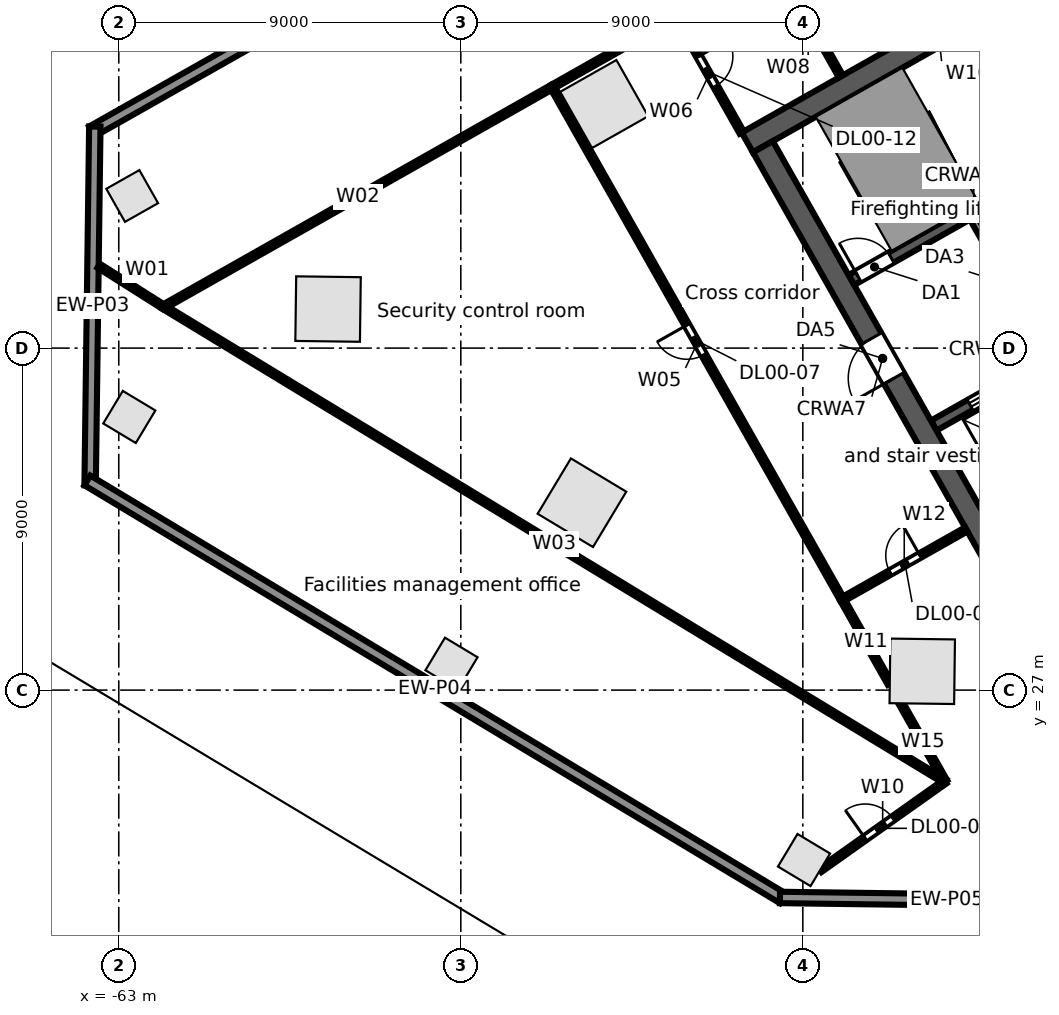
"""IFC4 building model, lengths in metres.
Left out: names, types, materials, properties, quantities, classifications, styles, units other than length and angle.
Written with IfcOpenShell. Run it as: python <this file> out.ifc"""

import sys

from ifc_helpers import new_model, si_unit, direction, frame, frame_2d, origin, origin_2d, place, context, subcontext, project, spatial, rectangle, extrude, element, fill, save


model = new_model("IFC4")
c1 = context("Model", 3, precision=1e-05, world=origin(), true_north=direction((0.0, 1.0)))
c2 = subcontext(c1, "Body", "Model", "MODEL_VIEW")
j1 = project(units=[si_unit("LENGTHUNIT", "METRE"), si_unit("PLANEANGLEUNIT", "RADIAN")], contexts=[c1])
p1 = place(None, origin())
s1 = spatial("IfcSite", under=j1, at=p1, CompositionType="ELEMENT")
p2 = place(p1, origin())
s2 = spatial("IfcBuilding", under=s1, at=p2, CompositionType="ELEMENT")
p3 = place(p2, origin())
s3 = spatial("IfcBuildingStorey", under=s2, at=p3, CompositionType="ELEMENT", Elevation=0.0)
for number, where, z_axis, x_axis in (
    (1, (-50.226, 42.423, 0.0), (0.0, 0.0, 1.0), (-0.87, -0.492, 0.0)),
    (2, (-57.493, 37.027, 0.0), (0.0, 0.0, 1.0), (-0.013, -1.0, 0.0)),
    (3, (-50.812, 31.931, 0.0), (0.0, 0.0, 1.0), (0.857, -0.515, 0.0)),
    (4, (-41.858, 27.495, 0.0), (0.0, 0.0, 1.0), (1.0, -0.013, 0.0)),
):
    element("IfcColumn", number, at=place(p3, frame(where, z_axis=z_axis, x_axis=x_axis)), inside=s3, PredefinedType="COLUMN", context=c2, shape_type="SweptSolid", body=[
        extrude(rectangle(XDim=1.7, YDim=1.7, at=origin_2d()), origin(), (0.0, 0.0, 1.0), 6.5),
    ])
for number, where, z_axis, x_axis in (
    (5, (-62.647, 40.003, 0.0), (0.0, 0.0, 1.0), (-0.87, -0.492, 0.0)),
    (6, (-62.723, 34.188, 0.0), (0.0, 0.0, 1.0), (0.857, -0.515, 0.0)),
    (7, (-54.245, 27.694, 0.0), (0.0, 0.0, 1.0), (0.857, -0.515, 0.0)),
    (8, (-44.969, 22.528, 0.0), (0.0, 0.0, 1.0), (0.857, -0.515, 0.0)),
):
    element("IfcColumn", number, at=place(p3, frame(where, z_axis=z_axis, x_axis=x_axis)), inside=s3, PredefinedType="COLUMN", context=c2, shape_type="SweptSolid", body=[
        extrude(rectangle(XDim=1.0, YDim=1.0, at=origin_2d()), origin(), (0.0, 0.0, 1.0), 6.5),
    ])
p4 = place(p3, frame((-63.707, 41.701, 0.0), z_axis=(0.0, 0.0, 1.0), x_axis=(0.870355510268, 0.492423888277, 0.0)))
e9 = element("IfcWall", 9, at=p4, inside=s3, PredefinedType="STANDARD", context=c2, shape_type="SweptSolid", body=[
    extrude(rectangle(XDim=67.903, YDim=0.3, at=frame_2d((33.952, 0.0))), origin(), (0.0, 0.0, 1.0), 6.15),
])
p5 = place(p4, frame((44.274, 0.0, 0.0)))
e10 = element("IfcOpeningElement", 10, at=p5, cuts=e9, PredefinedType="OPENING", context=c2, shape_type="SweptSolid", body=[
    extrude(rectangle(XDim=1.2, YDim=2.4, at=frame_2d((0.6, 1.2))), frame((0.0, 0.16, 0.0), z_axis=(0.0, -1.0, 0.0), x_axis=(1.0, 0.0, 0.0)), (0.0, 0.0, 1.0), 0.32),
])
p6 = place(p4, frame((15.222, 0.0, 0.0)))
e11 = element("IfcOpeningElement", 11, at=p6, cuts=e9, PredefinedType="OPENING", context=c2, shape_type="SweptSolid", body=[
    extrude(rectangle(XDim=1.2, YDim=2.4, at=frame_2d((0.6, 1.2))), frame((0.0, 0.16, 0.0), z_axis=(0.0, -1.0, 0.0), x_axis=(1.0, 0.0, 0.0)), (0.0, 0.0, 1.0), 0.32),
])
p7 = place(p3, frame((-63.754, 32.387, 0.0), z_axis=(0.0, 0.0, 1.0), x_axis=(0.013081929375, 0.999914427901, 0.0)))
e12 = element("IfcWall", 12, at=p7, inside=s3, PredefinedType="STANDARD", context=c2, shape_type="SweptSolid", body=[
    extrude(rectangle(XDim=9.443, YDim=0.3, at=frame_2d((4.722, 0.0))), origin(), (0.0, 0.0, 1.0), 6.15),
])
p8 = place(p3, frame((-45.526, 21.522, 0.0), z_axis=(0.0, 0.0, 1.0), x_axis=(-0.857164837164, 0.515042174903, 0.0)))
e13 = element("IfcWall", 13, at=p8, inside=s3, PredefinedType="STANDARD", context=c2, shape_type="SweptSolid", body=[
    extrude(rectangle(XDim=21.35, YDim=0.3, at=frame_2d((10.675, 0.0))), origin(), (0.0, 0.0, 1.0), 6.15),
])
p9 = place(p3, frame((-36.821, 21.428, 0.0), z_axis=(0.0, 0.0, 1.0), x_axis=(-0.999914252794, 0.013095306781, 0.0)))
e14 = element("IfcWall", 14, at=p9, inside=s3, PredefinedType="STANDARD", context=c2, shape_type="SweptSolid", body=[
    extrude(rectangle(XDim=8.781, YDim=0.3, at=frame_2d((4.391, 0.0))), origin(), (0.0, 0.0, 1.0), 6.15),
])
p10 = place(p3, frame((-41.556, 33.961, 0.0), z_axis=(0.0, 0.0, 1.0), x_axis=(0.870343731308, 0.492444706919, 0.0)))
e15 = element("IfcWall", 15, at=p10, inside=s3, PredefinedType="SOLIDWALL", context=c2, shape_type="SweptSolid", body=[
    extrude(rectangle(XDim=6.0, YDim=0.3, at=frame_2d((3.0, 0.0))), origin(), (0.0, 0.0, 1.0), 6.15),
])
p11 = place(p10, frame((1.1, 0.0, 0.0)))
e16 = element("IfcOpeningElement", 16, at=p11, cuts=e15, PredefinedType="OPENING", context=c2, shape_type="SweptSolid", body=[
    extrude(rectangle(XDim=1.1, YDim=2.1, at=frame_2d((0.55, 1.05))), frame((0.0, 0.16, 0.0), z_axis=(0.0, -1.0, 0.0), x_axis=(1.0, 0.0, 0.0)), (0.0, 0.0, 1.0), 0.32),
])
p12 = place(p10, frame((4.25, 0.0, 0.0)))
e17 = element("IfcOpeningElement", 17, at=p12, cuts=e15, PredefinedType="OPENING", context=c2, shape_type="SweptSolid", body=[
    extrude(rectangle(XDim=1.1, YDim=2.1, at=frame_2d((0.55, 1.05))), frame((0.0, 0.16, 0.0), z_axis=(0.0, -1.0, 0.0), x_axis=(1.0, 0.0, 0.0)), (0.0, 0.0, 1.0), 0.32),
])
p13 = place(p3, frame((-43.723, 37.791, 0.0), z_axis=(0.0, 0.0, 1.0), x_axis=(0.87035077051, 0.49243226567, 0.0)))
e18 = element("IfcWall", 18, at=p13, inside=s3, PredefinedType="SOLIDWALL", context=c2, shape_type="SweptSolid", body=[
    extrude(rectangle(XDim=7.4, YDim=0.3, at=frame_2d((3.7, 0.0))), origin(), (0.0, 0.0, 1.0), 6.15),
])
p14 = place(p13, frame((0.2, 0.0, 0.0)))
e19 = element("IfcOpeningElement", 19, at=p14, cuts=e18, PredefinedType="OPENING", context=c2, shape_type="SweptSolid", body=[
    extrude(rectangle(XDim=1.0, YDim=2.1, at=frame_2d((0.5, 1.05))), frame((0.0, 0.16, 0.0), z_axis=(0.0, -1.0, 0.0), x_axis=(1.0, 0.0, 0.0)), (0.0, 0.0, 1.0), 0.32),
])
p15 = place(p3, frame((-46.461, 41.412, 0.0), z_axis=(0.0, 0.0, 1.0), x_axis=(0.870350116061, 0.492433422375, 0.0)))
e20 = element("IfcWall", 20, at=p15, inside=s3, PredefinedType="SOLIDWALL", context=c2, shape_type="SweptSolid", body=[
    extrude(rectangle(XDim=17.0, YDim=0.6, at=frame_2d((8.5, 0.0))), origin(), (0.0, 0.0, 1.0), 6.15),
])
p16 = place(p3, frame((-46.052, 41.298, 0.0), z_axis=(0.0, 0.0, 1.0), x_axis=(0.492418598281, -0.870358503186, 0.0)))
e21 = element("IfcWall", 21, at=p16, inside=s3, PredefinedType="SOLIDWALL", context=c2, shape_type="SweptSolid", body=[
    extrude(rectangle(XDim=12.8, YDim=0.6, at=frame_2d((6.4, 0.0))), origin(), (0.0, 0.0, 1.0), 6.15),
])
p17 = place(p16, frame((5.8, 0.0, 0.0)))
e22 = element("IfcOpeningElement", 22, at=p17, cuts=e21, PredefinedType="OPENING", context=c2, shape_type="SweptSolid", body=[
    extrude(rectangle(XDim=1.2, YDim=2.1, at=frame_2d((0.6, 1.05))), frame((0.0, 0.31, 0.0), z_axis=(0.0, -1.0, 0.0), x_axis=(1.0, 0.0, 0.0)), (0.0, 0.0, 1.0), 0.62),
])
p18 = place(p3, frame((-40.516, 39.433, 0.0), z_axis=(0.0, 0.0, 1.0), x_axis=(0.492453559952, -0.87033872216, 0.0)))
e23 = element("IfcWall", 23, at=p18, inside=s3, PredefinedType="PARTITIONING", context=c2, shape_type="SweptSolid", body=[
    extrude(rectangle(XDim=4.1, YDim=0.2, at=frame_2d((2.05, 0.0))), origin(), (0.0, 0.0, 1.0), 6.15),
])
p19 = place(p18, frame((1.55, 0.0, 0.0)))
e24 = element("IfcOpeningElement", 24, at=p19, cuts=e23, PredefinedType="OPENING", context=c2, shape_type="SweptSolid", body=[
    extrude(rectangle(XDim=1.0, YDim=2.1, at=frame_2d((0.5, 1.05))), frame((0.0, 0.11, 0.0), z_axis=(0.0, -1.0, 0.0), x_axis=(1.0, 0.0, 0.0)), (0.0, 0.0, 1.0), 0.22),
])
p20 = place(p3, frame((-63.529, 38.167, 0.0), z_axis=(0.0, 0.0, 1.0), x_axis=(0.844913795328, -0.534902494352, 0.0)))
e25 = element("IfcWall", 25, at=p20, inside=s3, PredefinedType="PARTITIONING", context=c2, shape_type="SweptSolid", body=[
    extrude(rectangle(XDim=2.019, YDim=0.125, at=frame_2d((1.01, 0.0))), origin(), (0.0, 0.0, 1.0), 5.63),
])
p21 = place(p3, frame((-61.823, 37.087, 0.0), z_axis=(0.0, 0.0, 1.0), x_axis=(0.870357669928, 0.492420071074, 0.0)))
e26 = element("IfcWall", 26, at=p21, inside=s3, PredefinedType="PARTITIONING", context=c2, shape_type="SweptSolid", body=[
    extrude(rectangle(XDim=11.75, YDim=0.125, at=frame_2d((5.875, 0.0))), origin(), (0.0, 0.0, 1.0), 5.33),
])
p22 = place(p3, frame((-61.823, 37.087, 0.0), z_axis=(0.0, 0.0, 1.0), x_axis=(0.854710834679, -0.519104410579, 0.0)))
e27 = element("IfcWall", 27, at=p22, inside=s3, PredefinedType="PARTITIONING", context=c2, shape_type="SweptSolid", body=[
    extrude(rectangle(XDim=24.064, YDim=0.125, at=frame_2d((12.032, 0.0))), origin(), (0.0, 0.0, 1.0), 5.212),
])
p23 = place(p3, frame((-51.596, 42.873, 0.0), z_axis=(0.0, 0.0, 1.0), x_axis=(0.87043427122, 0.492284652905, 0.0)))
e28 = element("IfcWall", 28, at=p23, inside=s3, PredefinedType="PARTITIONING", context=c2, shape_type="SweptSolid", body=[
    extrude(rectangle(XDim=3.75, YDim=0.125, at=frame_2d((1.875, 0.0))), origin(), (0.0, 0.0, 1.0), 6.15),
])
p24 = place(p23, frame((1.95, 0.0, 0.0)))
e29 = element("IfcOpeningElement", 29, at=p24, cuts=e28, PredefinedType="OPENING", context=c2, shape_type="SweptSolid", body=[
    extrude(rectangle(XDim=0.9, YDim=2.1, at=frame_2d((0.45, 1.05))), frame((0.0, 0.073, 0.0), z_axis=(0.0, -1.0, 0.0), x_axis=(1.0, 0.0, 0.0)), (0.0, 0.0, 1.0), 0.145),
])
p25 = place(p3, frame((-51.596, 42.873, 0.0), z_axis=(0.0, 0.0, 1.0), x_axis=(0.492435038471, -0.870349201692, 0.0)))
e30 = element("IfcWall", 30, at=p25, inside=s3, PredefinedType="PARTITIONING", context=c2, shape_type="SweptSolid", body=[
    extrude(rectangle(XDim=15.501, YDim=0.125, at=frame_2d((7.75, 0.0))), origin(), (0.0, 0.0, 1.0), 5.212),
])
p26 = place(p25, frame((7.2, 0.0, 0.0)))
e31 = element("IfcOpeningElement", 31, at=p26, cuts=e30, PredefinedType="OPENING", context=c2, shape_type="SweptSolid", body=[
    extrude(rectangle(XDim=0.9, YDim=2.1, at=frame_2d((0.45, 1.05))), frame((0.0, 0.073, 0.0), z_axis=(0.0, -1.0, 0.0), x_axis=(1.0, 0.0, 0.0)), (0.0, 0.0, 1.0), 0.145),
])
p27 = place(p3, frame((-48.332, 44.719, 0.0), z_axis=(0.0, 0.0, 1.0), x_axis=(0.492392845909, -0.87037307248, 0.0)))
e32 = element("IfcWall", 32, at=p27, inside=s3, PredefinedType="PARTITIONING", context=c2, shape_type="SweptSolid", body=[
    extrude(rectangle(XDim=3.5, YDim=0.125, at=frame_2d((1.75, 0.0))), origin(), (0.0, 0.0, 1.0), 5.43),
])
p28 = place(p27, frame((1.2, 0.0, 0.0)))
e33 = element("IfcOpeningElement", 33, at=p28, cuts=e32, PredefinedType="OPENING", context=c2, shape_type="SweptSolid", body=[
    extrude(rectangle(XDim=0.9, YDim=2.1, at=frame_2d((0.45, 1.05))), frame((0.0, 0.073, 0.0), z_axis=(0.0, -1.0, 0.0), x_axis=(1.0, 0.0, 0.0)), (0.0, 0.0, 1.0), 0.145),
])
p29 = place(p3, frame((-45.721, 46.196, 0.0), z_axis=(0.0, 0.0, 1.0), x_axis=(0.492310098002, -0.870419879946, 0.0)))
e34 = element("IfcWall", 34, at=p29, inside=s3, PredefinedType="PARTITIONING", context=c2, shape_type="SweptSolid", body=[
    extrude(rectangle(XDim=3.5, YDim=0.125, at=frame_2d((1.75, 0.0))), origin(), (0.0, 0.0, 1.0), 5.43),
])
p30 = place(p3, frame((-44.544, 22.264, 0.0), z_axis=(0.0, 0.0, 1.0), x_axis=(0.815872106148, 0.578232398271, 0.0)))
e35 = element("IfcWall", 35, at=p30, inside=s3, PredefinedType="PARTITIONING", context=c2, shape_type="SweptSolid", body=[
    extrude(rectangle(XDim=4.031, YDim=0.125, at=frame_2d((2.016, 0.0))), origin(), (0.0, 0.0, 1.0), 5.524),
])
p31 = place(p30, frame((1.45, 0.0, 0.0)))
e36 = element("IfcOpeningElement", 36, at=p31, cuts=e35, PredefinedType="OPENING", context=c2, shape_type="SweptSolid", body=[
    extrude(rectangle(XDim=0.9, YDim=2.1, at=frame_2d((0.45, 1.05))), frame((0.0, 0.073, 0.0), z_axis=(0.0, -1.0, 0.0), x_axis=(1.0, 0.0, 0.0)), (0.0, 0.0, 1.0), 0.145),
])
p32 = place(p3, frame((-43.963, 29.382, 0.0), z_axis=(0.0, 0.0, 1.0), x_axis=(0.492408705769, -0.870364099951, 0.0)))
e37 = element("IfcWall", 37, at=p32, inside=s3, PredefinedType="PARTITIONING", context=c2, shape_type="SweptSolid", body=[
    extrude(rectangle(XDim=2.541, YDim=0.125, at=frame_2d((1.27, 0.0))), origin(), (0.0, 0.0, 1.0), 5.43),
])
p33 = place(p3, frame((-43.963, 29.382, 0.0), z_axis=(0.0, 0.0, 1.0), x_axis=(0.870259488443, 0.492593567533, 0.0)))
e38 = element("IfcWall", 38, at=p33, inside=s3, PredefinedType="PARTITIONING", context=c2, shape_type="SweptSolid", body=[
    extrude(rectangle(XDim=3.749, YDim=0.125, at=frame_2d((1.875, 0.0))), origin(), (0.0, 0.0, 1.0), 5.524),
])
p34 = place(p33, frame((1.45, 0.0, 0.0)))
e39 = element("IfcOpeningElement", 39, at=p34, cuts=e38, PredefinedType="OPENING", context=c2, shape_type="SweptSolid", body=[
    extrude(rectangle(XDim=0.9, YDim=2.1, at=frame_2d((0.45, 1.05))), frame((0.0, 0.073, 0.0), z_axis=(0.0, -1.0, 0.0), x_axis=(1.0, 0.0, 0.0)), (0.0, 0.0, 1.0), 0.145),
])
p35 = place(p3, frame((-42.419, 26.652, 0.0), z_axis=(0.0, 0.0, 1.0), x_axis=(0.49248604225, -0.870320342281, 0.0)))
e40 = element("IfcWall", 40, at=p35, inside=s3, PredefinedType="PARTITIONING", context=c2, shape_type="SweptSolid", body=[
    extrude(rectangle(XDim=2.364, YDim=0.125, at=frame_2d((1.182, 0.0))), origin(), (0.0, 0.0, 1.0), 6.15),
])
p36 = place(p11, origin())
e41 = element("IfcDoor", 41, at=p36, inside=s3, OperationType="DOUBLE_DOOR_SLIDING", PredefinedType="DOOR", context=c2, shape_type="SweptSolid", body=[
    extrude(rectangle(XDim=1.1, YDim=2.1, at=frame_2d((0.55, 1.05))), frame((0.0, 0.025, 0.0), z_axis=(0.0, -1.0, 0.0), x_axis=(1.0, 0.0, 0.0)), (0.0, 0.0, 1.0), 0.05),
])
fill(e16, e41)
p37 = place(p14, origin())
e42 = element("IfcDoor", 42, at=p37, inside=s3, OperationType="SINGLE_SWING_LEFT", PredefinedType="DOOR", context=c2, shape_type="SweptSolid", body=[
    extrude(rectangle(XDim=1.0, YDim=2.1, at=frame_2d((0.5, 1.05))), frame((0.0, 0.025, 0.0), z_axis=(0.0, -1.0, 0.0), x_axis=(1.0, 0.0, 0.0)), (0.0, 0.0, 1.0), 0.05),
])
fill(e19, e42)
p38 = place(p17, frame((1.2, 0.0, 0.0), z_axis=(0.0, 0.0, 1.0), x_axis=(-1.0, 0.0, 0.0)))
e43 = element("IfcDoor", 43, at=p38, inside=s3, OperationType="SINGLE_SWING_LEFT", PredefinedType="DOOR", context=c2, shape_type="SweptSolid", body=[
    extrude(rectangle(XDim=1.2, YDim=2.1, at=frame_2d((0.6, 1.05))), frame((0.0, 0.025, 0.0), z_axis=(0.0, -1.0, 0.0), x_axis=(1.0, 0.0, 0.0)), (0.0, 0.0, 1.0), 0.05),
])
fill(e22, e43)
p39 = place(p34, origin())
e44 = element("IfcDoor", 44, at=p39, inside=s3, OperationType="SINGLE_SWING_RIGHT", PredefinedType="DOOR", context=c2, shape_type="SweptSolid", body=[
    extrude(rectangle(XDim=0.9, YDim=2.1, at=frame_2d((0.45, 1.05))), frame((0.0, 0.025, 0.0), z_axis=(0.0, -1.0, 0.0), x_axis=(1.0, 0.0, 0.0)), (0.0, 0.0, 1.0), 0.05),
])
fill(e39, e44)
p40 = place(p26, frame((0.9, 0.0, 0.0), z_axis=(0.0, 0.0, 1.0), x_axis=(-1.0, 0.0, 0.0)))
e45 = element("IfcDoor", 45, at=p40, inside=s3, OperationType="SINGLE_SWING_RIGHT", PredefinedType="DOOR", context=c2, shape_type="SweptSolid", body=[
    extrude(rectangle(XDim=0.9, YDim=2.1, at=frame_2d((0.45, 1.05))), frame((0.0, 0.025, 0.0), z_axis=(0.0, -1.0, 0.0), x_axis=(1.0, 0.0, 0.0)), (0.0, 0.0, 1.0), 0.05),
])
fill(e31, e45)
p41 = place(p31, origin())
e46 = element("IfcDoor", 46, at=p41, inside=s3, OperationType="SINGLE_SWING_LEFT", PredefinedType="DOOR", context=c2, shape_type="SweptSolid", body=[
    extrude(rectangle(XDim=0.9, YDim=2.1, at=frame_2d((0.45, 1.05))), frame((0.0, 0.025, 0.0), z_axis=(0.0, -1.0, 0.0), x_axis=(1.0, 0.0, 0.0)), (0.0, 0.0, 1.0), 0.05),
])
fill(e36, e46)
p42 = place(p28, origin())
e47 = element("IfcDoor", 47, at=p42, inside=s3, OperationType="SINGLE_SWING_LEFT", PredefinedType="DOOR", context=c2, shape_type="SweptSolid", body=[
    extrude(rectangle(XDim=0.9, YDim=2.1, at=frame_2d((0.45, 1.05))), frame((0.0, 0.025, 0.0), z_axis=(0.0, -1.0, 0.0), x_axis=(1.0, 0.0, 0.0)), (0.0, 0.0, 1.0), 0.05),
])
fill(e33, e47)
save(model, sys.argv[1])
